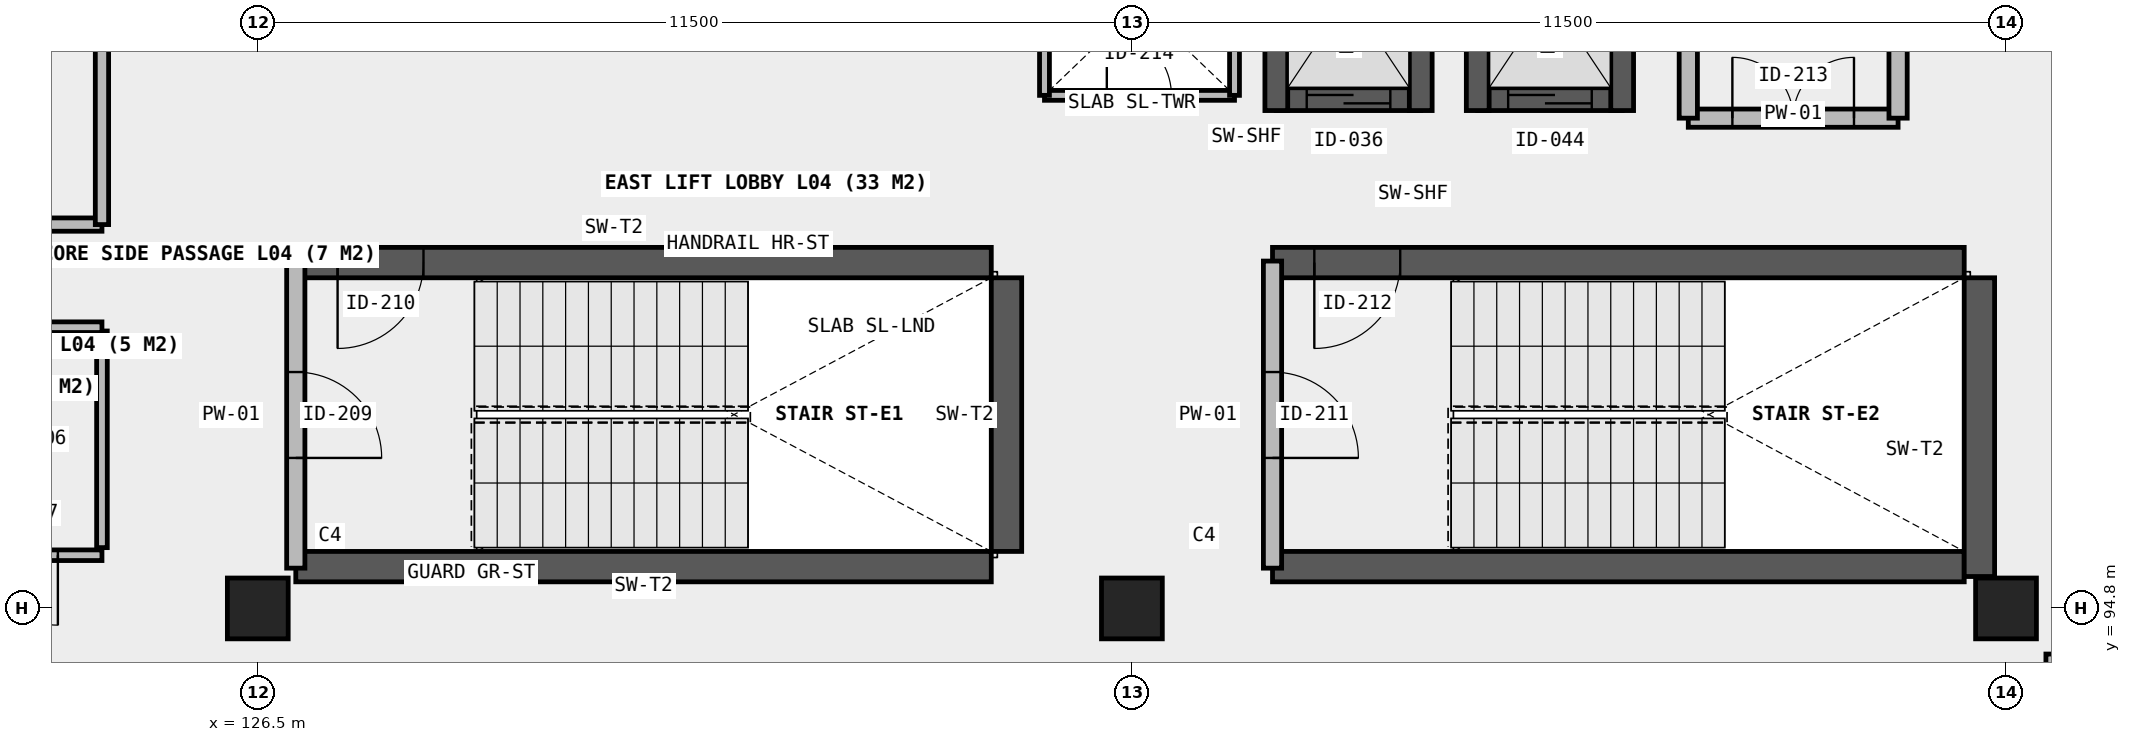
"""IFC4 building model, lengths in metres.
Left out: names, types, materials, properties, quantities, classifications, styles, units other than length and angle.
Written with IfcOpenShell. Run it as: python <this file> out.ifc"""

import sys

from ifc_helpers import new_model, si_unit, direction, frame, frame_2d, origin, origin_2d, place, context, subcontext, project, spatial, rectangle, extrude, element, fill, save


model = new_model("IFC4")
c1 = context("Model", 3, precision=1e-05, world=origin(), true_north=direction((0.0, 1.0)))
c2 = subcontext(c1, "Body", "Model", "MODEL_VIEW")
j1 = project(units=[si_unit("LENGTHUNIT", "METRE"), si_unit("PLANEANGLEUNIT", "RADIAN")], contexts=[c1])
p1 = place(None, origin())
s1 = spatial("IfcSite", under=j1, at=p1, CompositionType="ELEMENT")
p2 = place(p1, origin())
s2 = spatial("IfcBuilding", under=s1, at=p2, CompositionType="ELEMENT")
p3 = place(p2, frame((0.0, 0.0, 18.3)))
s3 = spatial("IfcBuildingStorey", under=s2, at=p3, CompositionType="ELEMENT", Elevation=18.3)
for number, where, z_axis, x_axis in (
    (1, (126.5, 94.8, 0.0), (0.0, 0.0, 1.0), (1.0, 0.0, 0.0)),
    (2, (138.0, 94.8, 0.0), (0.0, 0.0, 1.0), (1.0, 0.0, 0.0)),
    (3, (149.5, 94.8, 0.0), (0.0, 0.0, 1.0), (1.0, 0.0, 0.0)),
):
    element("IfcColumn", number, at=place(p3, frame(where, z_axis=z_axis, x_axis=x_axis)), inside=s3, PredefinedType="COLUMN", context=c2, shape_type="SweptSolid", body=[
        extrude(rectangle(XDim=0.8, YDim=0.8, at=origin_2d()), origin(), (0.0, 0.0, 1.0), 4.16),
    ])
p4 = place(p3, frame((139.9, 101.5, 0.0), z_axis=(0.0, 0.0, 1.0), x_axis=(1.0, 0.0, 0.0)))
e4 = element("IfcWall", 4, at=p4, inside=s3, PredefinedType="SHEAR", context=c2, shape_type="SweptSolid", body=[
    extrude(rectangle(XDim=1.9, YDim=0.3, at=frame_2d((0.95, 0.0))), origin(), (0.0, 0.0, 1.0), 4.16),
])
p5 = place(p4, frame((0.4, 0.0, 0.0)))
e5 = element("IfcOpeningElement", 5, at=p5, cuts=e4, PredefinedType="OPENING", context=c2, shape_type="SweptSolid", body=[
    extrude(rectangle(XDim=1.1, YDim=2.15, at=frame_2d((0.55, 1.075))), frame((0.0, 0.16, 0.0), z_axis=(0.0, -1.0, 0.0), x_axis=(1.0, 0.0, 0.0)), (0.0, 0.0, 1.0), 0.32),
])
for number, where, z_axis, x_axis in (
    (6, (139.9, 101.35, 0.0), (0.0, 0.0, 1.0), (0.0, 1.0, 0.0)),
    (7, (141.8, 101.35, 0.0), (0.0, 0.0, 1.0), (0.0, 1.0, 0.0)),
):
    element("IfcWall", number, at=place(p3, frame(where, z_axis=z_axis, x_axis=x_axis)), inside=s3, PredefinedType="SHEAR", context=c2, shape_type="SweptSolid", body=[
        extrude(rectangle(XDim=3.0, YDim=0.3, at=frame_2d((1.5, 0.0))), origin(), (0.0, 0.0, 1.0), 4.16),
    ])
p6 = place(p3, frame((142.55, 101.5, 0.0), z_axis=(0.0, 0.0, 1.0), x_axis=(1.0, 0.0, 0.0)))
e8 = element("IfcWall", 8, at=p6, inside=s3, PredefinedType="SHEAR", context=c2, shape_type="SweptSolid", body=[
    extrude(rectangle(XDim=1.9, YDim=0.3, at=frame_2d((0.95, 0.0))), origin(), (0.0, 0.0, 1.0), 4.16),
])
p7 = place(p6, frame((0.4, 0.0, 0.0)))
e9 = element("IfcOpeningElement", 9, at=p7, cuts=e8, PredefinedType="OPENING", context=c2, shape_type="SweptSolid", body=[
    extrude(rectangle(XDim=1.1, YDim=2.15, at=frame_2d((0.55, 1.075))), frame((0.0, 0.16, 0.0), z_axis=(0.0, -1.0, 0.0), x_axis=(1.0, 0.0, 0.0)), (0.0, 0.0, 1.0), 0.32),
])
for number, where, z_axis, x_axis in (
    (10, (142.55, 101.35, 0.0), (0.0, 0.0, 1.0), (0.0, 1.0, 0.0)),
    (11, (144.45, 101.35, 0.0), (0.0, 0.0, 1.0), (0.0, 1.0, 0.0)),
):
    element("IfcWall", number, at=place(p3, frame(where, z_axis=z_axis, x_axis=x_axis)), inside=s3, PredefinedType="SHEAR", context=c2, shape_type="SweptSolid", body=[
        extrude(rectangle(XDim=3.0, YDim=0.3, at=frame_2d((1.5, 0.0))), origin(), (0.0, 0.0, 1.0), 4.16),
    ])
p8 = place(p3, frame((127.0, 95.35, 0.0), z_axis=(0.0, 0.0, 1.0), x_axis=(1.0, 0.0, 0.0)))
e12 = element("IfcWall", 12, at=p8, inside=s3, PredefinedType="SHEAR", context=c2, shape_type="SweptSolid", body=[
    extrude(rectangle(XDim=9.15, YDim=0.4, at=frame_2d((4.575, 0.0))), origin(), (0.0, 0.0, 1.0), 4.16),
])
p9 = place(p3, frame((127.0, 99.35, 0.0), z_axis=(0.0, 0.0, 1.0), x_axis=(1.0, 0.0, 0.0)))
e13 = element("IfcWall", 13, at=p9, inside=s3, PredefinedType="SHEAR", context=c2, shape_type="SweptSolid", body=[
    extrude(rectangle(XDim=9.15, YDim=0.4, at=frame_2d((4.575, 0.0))), origin(), (0.0, 0.0, 1.0), 4.16),
])
p10 = place(p9, frame((0.55, 0.0, 0.0)))
e14 = element("IfcOpeningElement", 14, at=p10, cuts=e13, PredefinedType="OPENING", context=c2, shape_type="SweptSolid", body=[
    extrude(rectangle(XDim=1.13, YDim=2.15, at=frame_2d((0.565, 1.075))), frame((0.0, 0.21, 0.0), z_axis=(0.0, -1.0, 0.0), x_axis=(1.0, 0.0, 0.0)), (0.0, 0.0, 1.0), 0.42),
])
p11 = place(p3, frame((136.35, 95.55, 0.0), z_axis=(0.0, 0.0, 1.0), x_axis=(0.0, 1.0, 0.0)))
e15 = element("IfcWall", 15, at=p11, inside=s3, PredefinedType="SHEAR", context=c2, shape_type="SweptSolid", body=[
    extrude(rectangle(XDim=3.6, YDim=0.4, at=frame_2d((1.8, 0.0))), origin(), (0.0, 0.0, 1.0), 4.16),
])
p12 = place(p3, frame((139.85, 95.35, 0.0), z_axis=(0.0, 0.0, 1.0), x_axis=(1.0, 0.0, 0.0)))
e16 = element("IfcWall", 16, at=p12, inside=s3, PredefinedType="SHEAR", context=c2, shape_type="SweptSolid", body=[
    extrude(rectangle(XDim=9.1, YDim=0.4, at=frame_2d((4.55, 0.0))), origin(), (0.0, 0.0, 1.0), 4.16),
])
p13 = place(p3, frame((139.85, 99.35, 0.0), z_axis=(0.0, 0.0, 1.0), x_axis=(1.0, 0.0, 0.0)))
e17 = element("IfcWall", 17, at=p13, inside=s3, PredefinedType="SHEAR", context=c2, shape_type="SweptSolid", body=[
    extrude(rectangle(XDim=9.1, YDim=0.4, at=frame_2d((4.55, 0.0))), origin(), (0.0, 0.0, 1.0), 4.16),
])
p14 = place(p13, frame((0.55, 0.0, 0.0)))
e18 = element("IfcOpeningElement", 18, at=p14, cuts=e17, PredefinedType="OPENING", context=c2, shape_type="SweptSolid", body=[
    extrude(rectangle(XDim=1.13, YDim=2.15, at=frame_2d((0.565, 1.075))), frame((0.0, 0.21, 0.0), z_axis=(0.0, -1.0, 0.0), x_axis=(1.0, 0.0, 0.0)), (0.0, 0.0, 1.0), 0.42),
])
p15 = place(p3, frame((149.15, 95.22, 0.0), z_axis=(0.0, 0.0, 1.0), x_axis=(0.0, 1.0, 0.0)))
e19 = element("IfcWall", 19, at=p15, inside=s3, PredefinedType="SHEAR", context=c2, shape_type="SweptSolid", body=[
    extrude(rectangle(XDim=3.93, YDim=0.4, at=frame_2d((1.965, 0.0))), origin(), (0.0, 0.0, 1.0), 4.16),
])
p16 = place(p3, frame((127.0, 95.33, 0.0), z_axis=(0.0, 0.0, 1.0), x_axis=(0.0, 1.0, 0.0)))
e20 = element("IfcWall", 20, at=p16, inside=s3, PredefinedType="SOLIDWALL", context=c2, shape_type="SweptSolid", body=[
    extrude(rectangle(XDim=4.04, YDim=0.24, at=frame_2d((2.02, 0.0))), origin(), (0.0, 0.0, 1.0), 3.88),
])
p17 = place(p16, frame((1.45, 0.0, 0.0)))
e21 = element("IfcOpeningElement", 21, at=p17, cuts=e20, PredefinedType="OPENING", context=c2, shape_type="SweptSolid", body=[
    extrude(rectangle(XDim=1.13, YDim=2.15, at=frame_2d((0.565, 1.075))), frame((0.0, 0.13, 0.0), z_axis=(0.0, -1.0, 0.0), x_axis=(1.0, 0.0, 0.0)), (0.0, 0.0, 1.0), 0.26),
])
p18 = place(p3, frame((139.85, 95.33, 0.0), z_axis=(0.0, 0.0, 1.0), x_axis=(0.0, 1.0, 0.0)))
e22 = element("IfcWall", 22, at=p18, inside=s3, PredefinedType="SOLIDWALL", context=c2, shape_type="SweptSolid", body=[
    extrude(rectangle(XDim=4.04, YDim=0.24, at=frame_2d((2.02, 0.0))), origin(), (0.0, 0.0, 1.0), 3.88),
])
p19 = place(p18, frame((1.45, 0.0, 0.0)))
e23 = element("IfcOpeningElement", 23, at=p19, cuts=e22, PredefinedType="OPENING", context=c2, shape_type="SweptSolid", body=[
    extrude(rectangle(XDim=1.13, YDim=2.15, at=frame_2d((0.565, 1.075))), frame((0.0, 0.13, 0.0), z_axis=(0.0, -1.0, 0.0), x_axis=(1.0, 0.0, 0.0)), (0.0, 0.0, 1.0), 0.26),
])
p20 = place(p3, frame((145.32, 101.25, 0.0), z_axis=(0.0, 0.0, 1.0), x_axis=(1.0, 0.0, 0.0)))
e24 = element("IfcWall", 24, at=p20, inside=s3, PredefinedType="SOLIDWALL", context=c2, shape_type="SweptSolid", body=[
    extrude(rectangle(XDim=2.76, YDim=0.24, at=frame_2d((1.38, 0.0))), origin(), (0.0, 0.0, 1.0), 3.88),
])
p21 = place(p20, frame((0.58, 0.0, 0.0)))
e25 = element("IfcOpeningElement", 25, at=p21, cuts=e24, PredefinedType="OPENING", context=c2, shape_type="SweptSolid", body=[
    extrude(rectangle(XDim=1.6, YDim=2.15, at=frame_2d((0.8, 1.075))), frame((0.0, 0.13, 0.0), z_axis=(0.0, -1.0, 0.0), x_axis=(1.0, 0.0, 0.0)), (0.0, 0.0, 1.0), 0.26),
])
for number, where, z_axis, x_axis in (
    (26, (145.32, 101.25, 0.0), (0.0, 0.0, 1.0), (0.0, 1.0, 0.0)),
    (27, (148.08, 101.25, 0.0), (0.0, 0.0, 1.0), (0.0, 1.0, 0.0)),
):
    element("IfcWall", number, at=place(p3, frame(where, z_axis=z_axis, x_axis=x_axis)), inside=s3, PredefinedType="SOLIDWALL", context=c2, shape_type="SweptSolid", body=[
        extrude(rectangle(XDim=2.6, YDim=0.24, at=frame_2d((1.3, 0.0))), origin(), (0.0, 0.0, 1.0), 3.88),
    ])
p22 = place(p3, frame((136.85, 101.55, 0.0), z_axis=(0.0, 0.0, 1.0), x_axis=(1.0, 0.0, 0.0)))
e28 = element("IfcWall", 28, at=p22, inside=s3, PredefinedType="PLUMBINGWALL", context=c2, shape_type="SweptSolid", body=[
    extrude(rectangle(XDim=2.5, YDim=0.13, at=frame_2d((1.25, 0.0))), origin(), (0.0, 0.0, 1.0), 3.88),
])
p23 = place(p22, frame((0.82, 0.0, 0.0)))
e29 = element("IfcOpeningElement", 29, at=p23, cuts=e28, PredefinedType="OPENING", context=c2, shape_type="SweptSolid", body=[
    extrude(rectangle(XDim=0.85, YDim=2.0, at=frame_2d((0.425, 1.0))), frame((0.0, 0.075, 0.0), z_axis=(0.0, -1.0, 0.0), x_axis=(1.0, 0.0, 0.0)), (0.0, 0.0, 1.0), 0.15),
])
for number, where, z_axis, x_axis in (
    (30, (136.85, 101.55, 0.0), (0.0, 0.0, 1.0), (0.0, 1.0, 0.0)),
    (31, (139.35, 101.55, 0.0), (0.0, 0.0, 1.0), (0.0, 1.0, 0.0)),
):
    element("IfcWall", number, at=place(p3, frame(where, z_axis=z_axis, x_axis=x_axis)), inside=s3, PredefinedType="PLUMBINGWALL", context=c2, shape_type="SweptSolid", body=[
        extrude(rectangle(XDim=2.4, YDim=0.13, at=frame_2d((1.2, 0.0))), origin(), (0.0, 0.0, 1.0), 3.88),
    ])
p24 = place(p3, frame((118.15, 95.5, 0.0), z_axis=(0.0, 0.0, 1.0), x_axis=(1.0, 0.0, 0.0)))
e32 = element("IfcWall", 32, at=p24, inside=s3, PredefinedType="PLUMBINGWALL", context=c2, shape_type="SweptSolid", body=[
    extrude(rectangle(XDim=6.3, YDim=0.14, at=frame_2d((3.15, 0.0))), origin(), (0.0, 0.0, 1.0), 3.88),
])
p25 = place(p24, frame((0.72, 0.0, 0.0)))
e33 = element("IfcOpeningElement", 33, at=p25, cuts=e32, PredefinedType="OPENING", context=c2, shape_type="SweptSolid", body=[
    extrude(rectangle(XDim=0.95, YDim=2.1, at=frame_2d((0.475, 1.05))), frame((0.0, 0.08, 0.0), z_axis=(0.0, -1.0, 0.0), x_axis=(1.0, 0.0, 0.0)), (0.0, 0.0, 1.0), 0.16),
])
p26 = place(p24, frame((2.8, 0.0, 0.0)))
e34 = element("IfcOpeningElement", 34, at=p26, cuts=e32, PredefinedType="OPENING", context=c2, shape_type="SweptSolid", body=[
    extrude(rectangle(XDim=0.92, YDim=2.1, at=frame_2d((0.46, 1.05))), frame((0.0, 0.08, 0.0), z_axis=(0.0, -1.0, 0.0), x_axis=(1.0, 0.0, 0.0)), (0.0, 0.0, 1.0), 0.16),
])
p27 = place(p24, frame((4.8, 0.0, 0.0)))
e35 = element("IfcOpeningElement", 35, at=p27, cuts=e32, PredefinedType="OPENING", context=c2, shape_type="SweptSolid", body=[
    extrude(rectangle(XDim=0.92, YDim=2.1, at=frame_2d((0.46, 1.05))), frame((0.0, 0.08, 0.0), z_axis=(0.0, -1.0, 0.0), x_axis=(1.0, 0.0, 0.0)), (0.0, 0.0, 1.0), 0.16),
])
p28 = place(p3, frame((124.45, 95.6, 0.0), z_axis=(0.0, 0.0, 1.0), x_axis=(0.0, 1.0, 0.0)))
e36 = element("IfcWall", 36, at=p28, inside=s3, PredefinedType="PLUMBINGWALL", context=c2, shape_type="SweptSolid", body=[
    extrude(rectangle(XDim=2.85, YDim=0.14, at=frame_2d((1.425, 0.0))), origin(), (0.0, 0.0, 1.0), 3.88),
])
p29 = place(p3, frame((118.15, 98.5, 0.0), z_axis=(0.0, 0.0, 1.0), x_axis=(1.0, 0.0, 0.0)))
e37 = element("IfcWall", 37, at=p29, inside=s3, PredefinedType="PLUMBINGWALL", context=c2, shape_type="SweptSolid", body=[
    extrude(rectangle(XDim=6.3, YDim=0.14, at=frame_2d((3.15, 0.0))), origin(), (0.0, 0.0, 1.0), 3.88),
])
p30 = place(p3, frame((115.16, 99.85, 0.0), z_axis=(0.0, 0.0, 1.0), x_axis=(1.0, 0.0, 0.0)))
e38 = element("IfcWall", 38, at=p30, inside=s3, PredefinedType="PARTITIONING", context=c2, shape_type="SweptSolid", body=[
    extrude(rectangle(XDim=9.29, YDim=0.175, at=frame_2d((4.645, 0.0))), origin(), (0.0, 0.0, 1.0), 3.88),
])
p31 = place(p30, frame((3.64, 0.0, 0.0)))
e39 = element("IfcOpeningElement", 39, at=p31, cuts=e38, PredefinedType="OPENING", context=c2, shape_type="SweptSolid", body=[
    extrude(rectangle(XDim=1.3, YDim=2.2, at=frame_2d((0.65, 1.1))), frame((0.0, 0.098, 0.0), z_axis=(0.0, -1.0, 0.0), x_axis=(1.0, 0.0, 0.0)), (0.0, 0.0, 1.0), 0.195),
])
p32 = place(p3, frame((124.45, 99.85, 0.0), z_axis=(0.0, 0.0, 1.0), x_axis=(0.0, 1.0, 0.0)))
e40 = element("IfcWall", 40, at=p32, inside=s3, PredefinedType="PARTITIONING", context=c2, shape_type="SweptSolid", body=[
    extrude(rectangle(XDim=14.55, YDim=0.175, at=frame_2d((7.275, 0.0))), origin(), (0.0, 0.0, 1.0), 3.88),
])
p33 = place(p3, frame((150.1, 86.4, 0.0), z_axis=(0.0, 0.0, 1.0), x_axis=(0.0, 1.0, 0.0)))
e41 = element("IfcWall", 41, at=p33, inside=s3, PredefinedType="PARTITIONING", context=c2, shape_type="SweptSolid", body=[
    extrude(rectangle(XDim=7.8, YDim=0.15, at=frame_2d((3.9, 0.0))), origin(), (0.0, 0.0, 1.0), 3.88),
])
p34 = place(p33, frame((2.8, 0.0, 0.0)))
e42 = element("IfcOpeningElement", 42, at=p34, cuts=e41, PredefinedType="OPENING", context=c2, shape_type="SweptSolid", body=[
    extrude(rectangle(XDim=1.4, YDim=2.15, at=frame_2d((0.7, 1.075))), frame((0.0, 0.085, 0.0), z_axis=(0.0, -1.0, 0.0), x_axis=(1.0, 0.0, 0.0)), (0.0, 0.0, 1.0), 0.17),
])
p35 = place(p5, origin())
e43 = element("IfcDoor", 43, at=p35, inside=s3, OperationType="SLIDING_TO_LEFT", PredefinedType="DOOR", context=c2, shape_type="SweptSolid", body=[
    extrude(rectangle(XDim=1.1, YDim=2.15, at=frame_2d((0.55, 1.075))), frame((0.0, 0.025, 0.0), z_axis=(0.0, -1.0, 0.0), x_axis=(1.0, 0.0, 0.0)), (0.0, 0.0, 1.0), 0.05),
])
fill(e5, e43)
p36 = place(p7, origin())
e44 = element("IfcDoor", 44, at=p36, inside=s3, OperationType="SLIDING_TO_LEFT", PredefinedType="DOOR", context=c2, shape_type="SweptSolid", body=[
    extrude(rectangle(XDim=1.1, YDim=2.15, at=frame_2d((0.55, 1.075))), frame((0.0, 0.025, 0.0), z_axis=(0.0, -1.0, 0.0), x_axis=(1.0, 0.0, 0.0)), (0.0, 0.0, 1.0), 0.05),
])
fill(e9, e44)
p37 = place(p17, frame((0.565, 0.0, 0.0), z_axis=(0.0, 0.0, 1.0), x_axis=(-1.0, 0.0, 0.0)))
e45 = element("IfcDoor", 45, at=p37, inside=s3, OperationType="SINGLE_SWING_LEFT", PredefinedType="DOOR", context=c2, shape_type="SweptSolid", body=[
    extrude(rectangle(XDim=1.13, YDim=2.15, at=frame_2d((0.0, 1.075))), frame((0.0, 0.025, 0.0), z_axis=(0.0, -1.0, 0.0), x_axis=(1.0, 0.0, 0.0)), (0.0, 0.0, 1.0), 0.05),
])
fill(e21, e45)
p38 = place(p10, frame((0.565, 0.0, 0.0), z_axis=(0.0, 0.0, 1.0), x_axis=(-1.0, 0.0, 0.0)))
e46 = element("IfcDoor", 46, at=p38, inside=s3, OperationType="SINGLE_SWING_LEFT", PredefinedType="DOOR", context=c2, shape_type="SweptSolid", body=[
    extrude(rectangle(XDim=1.13, YDim=2.15, at=frame_2d((0.0, 1.075))), frame((0.0, 0.025, 0.0), z_axis=(0.0, -1.0, 0.0), x_axis=(1.0, 0.0, 0.0)), (0.0, 0.0, 1.0), 0.05),
])
fill(e14, e46)
p39 = place(p19, frame((0.565, 0.0, 0.0), z_axis=(0.0, 0.0, 1.0), x_axis=(-1.0, 0.0, 0.0)))
e47 = element("IfcDoor", 47, at=p39, inside=s3, OperationType="SINGLE_SWING_LEFT", PredefinedType="DOOR", context=c2, shape_type="SweptSolid", body=[
    extrude(rectangle(XDim=1.13, YDim=2.15, at=frame_2d((0.0, 1.075))), frame((0.0, 0.025, 0.0), z_axis=(0.0, -1.0, 0.0), x_axis=(1.0, 0.0, 0.0)), (0.0, 0.0, 1.0), 0.05),
])
fill(e23, e47)
p40 = place(p14, frame((0.565, 0.0, 0.0), z_axis=(0.0, 0.0, 1.0), x_axis=(-1.0, 0.0, 0.0)))
e48 = element("IfcDoor", 48, at=p40, inside=s3, OperationType="SINGLE_SWING_LEFT", PredefinedType="DOOR", context=c2, shape_type="SweptSolid", body=[
    extrude(rectangle(XDim=1.13, YDim=2.15, at=frame_2d((0.0, 1.075))), frame((0.0, 0.025, 0.0), z_axis=(0.0, -1.0, 0.0), x_axis=(1.0, 0.0, 0.0)), (0.0, 0.0, 1.0), 0.05),
])
fill(e18, e48)
p41 = place(p21, origin())
e49 = element("IfcDoor", 49, at=p41, inside=s3, OperationType="DOUBLE_DOOR_SINGLE_SWING", PredefinedType="DOOR", context=c2, shape_type="SweptSolid", body=[
    extrude(rectangle(XDim=1.6, YDim=2.15, at=frame_2d((0.8, 1.075))), frame((0.0, 0.025, 0.0), z_axis=(0.0, -1.0, 0.0), x_axis=(1.0, 0.0, 0.0)), (0.0, 0.0, 1.0), 0.05),
])
fill(e25, e49)
p42 = place(p23, origin())
e50 = element("IfcDoor", 50, at=p42, inside=s3, OperationType="SINGLE_SWING_LEFT", PredefinedType="TRAPDOOR", context=c2, shape_type="SweptSolid", body=[
    extrude(rectangle(XDim=0.85, YDim=2.0, at=frame_2d((0.425, 1.0))), frame((0.0, 0.025, 0.0), z_axis=(0.0, -1.0, 0.0), x_axis=(1.0, 0.0, 0.0)), (0.0, 0.0, 1.0), 0.05),
])
fill(e29, e50)
p43 = place(p27, origin())
e51 = element("IfcDoor", 51, at=p43, inside=s3, OperationType="SINGLE_SWING_RIGHT", PredefinedType="DOOR", context=c2, shape_type="SweptSolid", body=[
    extrude(rectangle(XDim=0.92, YDim=2.1, at=frame_2d((0.46, 1.05))), frame((0.0, 0.025, 0.0), z_axis=(0.0, -1.0, 0.0), x_axis=(1.0, 0.0, 0.0)), (0.0, 0.0, 1.0), 0.05),
])
fill(e35, e51)
save(model, sys.argv[1])
